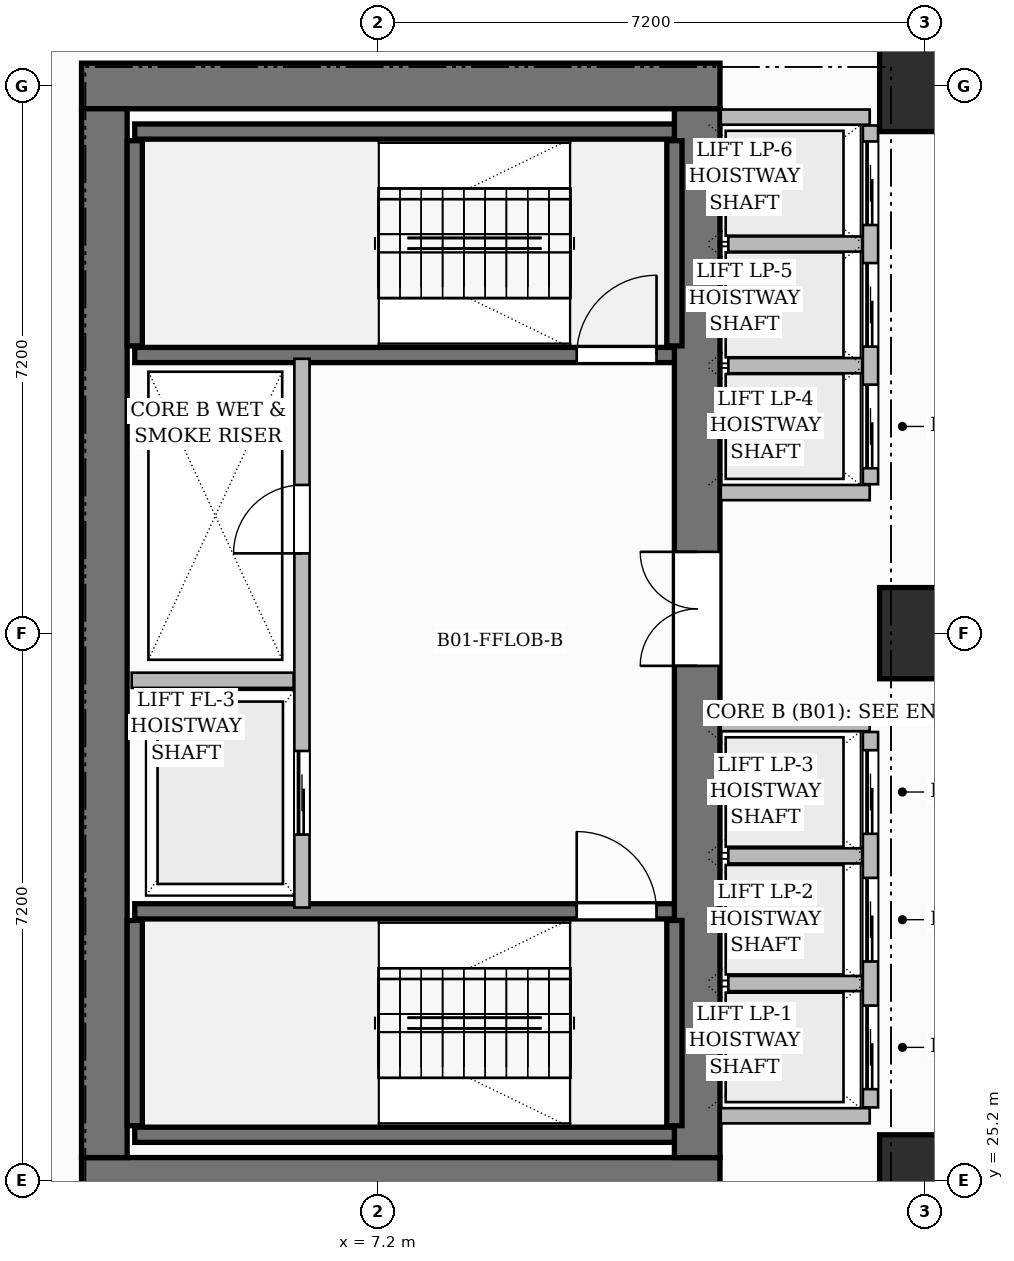
"""IFC4 building model, lengths in metres.
Left out: names, types, materials, properties, quantities, classifications, styles, units other than length and angle.
Written with IfcOpenShell. Run it as: python <this file> out.ifc"""

import sys

from ifc_helpers import new_model, si_unit, direction, frame, frame_2d, origin, origin_2d, place, context, subcontext, project, spatial, rectangle, extrude, source, transform, mapped, element, fill, save


model = new_model("IFC4")
c1 = context("Model", 3, precision=1e-05, world=origin(), true_north=direction((0.0, 1.0)))
c2 = subcontext(c1, "Body", "Model", "MODEL_VIEW")
j1 = project(units=[si_unit("LENGTHUNIT", "METRE"), si_unit("PLANEANGLEUNIT", "RADIAN")], contexts=[c1])
p1 = place(None, origin())
s1 = spatial("IfcSite", under=j1, at=p1, CompositionType="ELEMENT")
p2 = place(p1, origin())
s2 = spatial("IfcBuilding", under=s1, at=p2, CompositionType="ELEMENT")
p3 = place(p2, frame((0.0, 0.0, -6.5)))
s3 = spatial("IfcBuildingStorey", under=s2, at=p3, CompositionType="ELEMENT", Elevation=-6.5)
for number, where, z_axis, x_axis in (
    (1, (3.3, 25.2, 0.0), (0.0, 0.0, 1.0), (1.0, 0.0, 0.0)),
    (2, (3.3, 39.6, 0.0), (0.0, 0.0, 1.0), (1.0, 0.0, 0.0)),
):
    element("IfcWall", number, at=place(p3, frame(where, z_axis=z_axis, x_axis=x_axis)), inside=s3, PredefinedType="SHEAR", context=c2, shape_type="SweptSolid", body=[
        extrude(rectangle(XDim=8.4, YDim=0.6, at=frame_2d((4.2, 0.0))), origin(), (0.0, 0.0, 1.0), 6.5),
    ])
p4 = place(p3, frame((3.6, 25.5, 0.0), z_axis=(0.0, 0.0, 1.0), x_axis=(0.0, 1.0, 0.0)))
e3 = element("IfcWall", 3, at=p4, inside=s3, PredefinedType="SHEAR", context=c2, shape_type="SweptSolid", body=[
    extrude(rectangle(XDim=13.8, YDim=0.6, at=frame_2d((6.9, 0.0))), origin(), (0.0, 0.0, 1.0), 6.5),
])
p5 = place(p3, frame((11.4, 25.5, 0.0), z_axis=(0.0, 0.0, 1.0), x_axis=(0.0, 1.0, 0.0)))
e4 = element("IfcWall", 4, at=p5, inside=s3, PredefinedType="SHEAR", context=c2, shape_type="SweptSolid", body=[
    extrude(rectangle(XDim=13.8, YDim=0.6, at=frame_2d((6.9, 0.0))), origin(), (0.0, 0.0, 1.0), 6.5),
])
p6 = place(p5, frame((6.47, 0.0, 0.0)))
e5 = element("IfcOpeningElement", 5, at=p6, cuts=e4, PredefinedType="OPENING", context=c2, shape_type="SweptSolid", body=[
    extrude(rectangle(XDim=1.5, YDim=2.2, at=frame_2d((0.75, 1.1))), frame((0.0, 0.31, 0.0), z_axis=(0.0, -1.0, 0.0), x_axis=(1.0, 0.0, 0.0)), (0.0, 0.0, 1.0), 0.62),
])
m1 = source(origin(), c2, "Body", "SweptSolid", [
    extrude(rectangle(XDim=1.2, YDim=1.2, at=origin_2d()), origin(), (0.0, 0.0, 1.0), 6.5),
])
for number, where, z_axis, x_axis in (
    (6, (14.4, 25.2, 0.0), (0.0, 0.0, 1.0), (1.0, 0.0, 0.0)),
    (7, (14.4, 32.4, 0.0), (0.0, 0.0, 1.0), (1.0, 0.0, 0.0)),
    (8, (14.4, 39.6, 0.0), (0.0, 0.0, 1.0), (1.0, 0.0, 0.0)),
):
    element("IfcColumn", number, at=place(p3, frame(where, z_axis=z_axis, x_axis=x_axis)), inside=s3, PredefinedType="COLUMN", context=c2, shape_type="MappedRepresentation", body=[
        mapped(m1, transform((0.0, 0.0, 0.0), scale=1.0)),
    ])
p7 = place(p3, frame((4.0, 25.8, 0.0), z_axis=(0.0, 0.0, 1.0), x_axis=(1.0, 0.0, 0.0)))
e9 = element("IfcWall", 9, at=p7, inside=s3, PredefinedType="SHEAR", context=c2, shape_type="SweptSolid", body=[
    extrude(rectangle(XDim=7.1, YDim=0.2, at=frame_2d((3.55, 0.0))), origin(), (0.0, 0.0, 1.0), 6.5),
])
for number, where, z_axis, x_axis in (
    (10, (4.0, 25.92, 0.0), (0.0, 0.0, 1.0), (0.0, 1.0, 0.0)),
    (11, (11.1, 25.92, 0.0), (0.0, 0.0, 1.0), (0.0, 1.0, 0.0)),
):
    element("IfcWall", number, at=place(p3, frame(where, z_axis=z_axis, x_axis=x_axis)), inside=s3, PredefinedType="SHEAR", context=c2, shape_type="SweptSolid", body=[
        extrude(rectangle(XDim=2.7, YDim=0.2, at=frame_2d((1.35, 0.0))), origin(), (0.0, 0.0, 1.0), 6.5),
    ])
p8 = place(p3, frame((4.0, 28.74, 0.0), z_axis=(0.0, 0.0, 1.0), x_axis=(1.0, 0.0, 0.0)))
e12 = element("IfcWall", 12, at=p8, inside=s3, PredefinedType="SHEAR", context=c2, shape_type="SweptSolid", body=[
    extrude(rectangle(XDim=7.1, YDim=0.2, at=frame_2d((3.55, 0.0))), origin(), (0.0, 0.0, 1.0), 6.5),
])
p9 = place(p8, frame((5.815, 0.0, 0.0)))
e13 = element("IfcOpeningElement", 13, at=p9, cuts=e12, PredefinedType="OPENING", context=c2, shape_type="SweptSolid", body=[
    extrude(rectangle(XDim=1.05, YDim=2.2, at=frame_2d((0.525, 1.1))), frame((0.0, 0.11, 0.0), z_axis=(0.0, -1.0, 0.0), x_axis=(1.0, 0.0, 0.0)), (0.0, 0.0, 1.0), 0.22),
])
p10 = place(p3, frame((4.0, 39.0, 0.0), z_axis=(0.0, 0.0, 1.0), x_axis=(1.0, 0.0, 0.0)))
e14 = element("IfcWall", 14, at=p10, inside=s3, PredefinedType="SHEAR", context=c2, shape_type="SweptSolid", body=[
    extrude(rectangle(XDim=7.1, YDim=0.2, at=frame_2d((3.55, 0.0))), origin(), (0.0, 0.0, 1.0), 6.5),
])
for number, where, z_axis, x_axis in (
    (15, (4.0, 36.18, 0.0), (0.0, 0.0, 1.0), (0.0, 1.0, 0.0)),
    (16, (11.1, 36.18, 0.0), (0.0, 0.0, 1.0), (0.0, 1.0, 0.0)),
):
    element("IfcWall", number, at=place(p3, frame(where, z_axis=z_axis, x_axis=x_axis)), inside=s3, PredefinedType="SHEAR", context=c2, shape_type="SweptSolid", body=[
        extrude(rectangle(XDim=2.7, YDim=0.2, at=frame_2d((1.35, 0.0))), origin(), (0.0, 0.0, 1.0), 6.5),
    ])
p11 = place(p3, frame((4.0, 36.06, 0.0), z_axis=(0.0, 0.0, 1.0), x_axis=(1.0, 0.0, 0.0)))
e17 = element("IfcWall", 17, at=p11, inside=s3, PredefinedType="SHEAR", context=c2, shape_type="SweptSolid", body=[
    extrude(rectangle(XDim=7.1, YDim=0.2, at=frame_2d((3.55, 0.0))), origin(), (0.0, 0.0, 1.0), 6.5),
])
p12 = place(p11, frame((5.815, 0.0, 0.0)))
e18 = element("IfcOpeningElement", 18, at=p12, cuts=e17, PredefinedType="OPENING", context=c2, shape_type="SweptSolid", body=[
    extrude(rectangle(XDim=1.05, YDim=2.2, at=frame_2d((0.525, 1.1))), frame((0.0, 0.11, 0.0), z_axis=(0.0, -1.0, 0.0), x_axis=(1.0, 0.0, 0.0)), (0.0, 0.0, 1.0), 0.22),
])
p13 = place(p3, frame((6.2, 28.79, 0.0), z_axis=(0.0, 0.0, 1.0), x_axis=(0.0, 1.0, 0.0)))
e19 = element("IfcWall", 19, at=p13, inside=s3, PredefinedType="PARTITIONING", context=c2, shape_type="SweptSolid", body=[
    extrude(rectangle(XDim=7.22, YDim=0.2, at=frame_2d((3.61, 0.0))), origin(), (0.0, 0.0, 1.0), 6.1),
])
p14 = place(p13, frame((4.66, 0.0, 0.0)))
e20 = element("IfcOpeningElement", 20, at=p14, cuts=e19, PredefinedType="OPENING", context=c2, shape_type="SweptSolid", body=[
    extrude(rectangle(XDim=0.9, YDim=2.1, at=frame_2d((0.45, 1.05))), frame((0.0, 0.11, 0.0), z_axis=(0.0, -1.0, 0.0), x_axis=(1.0, 0.0, 0.0)), (0.0, 0.0, 1.0), 0.22),
])
p15 = place(p13, frame((0.96, 0.0, 0.0)))
e21 = element("IfcOpeningElement", 21, at=p15, cuts=e19, PredefinedType="OPENING", context=c2, shape_type="SweptSolid", body=[
    extrude(rectangle(XDim=1.1, YDim=2.2, at=frame_2d((0.55, 1.1))), frame((0.0, 0.11, 0.0), z_axis=(0.0, -1.0, 0.0), x_axis=(1.0, 0.0, 0.0)), (0.0, 0.0, 1.0), 0.22),
])
p16 = place(p3, frame((3.96, 31.78, 0.0), z_axis=(0.0, 0.0, 1.0), x_axis=(1.0, 0.0, 0.0)))
e22 = element("IfcWall", 22, at=p16, inside=s3, PredefinedType="PARTITIONING", context=c2, shape_type="SweptSolid", body=[
    extrude(rectangle(XDim=2.13, YDim=0.2, at=frame_2d((1.065, 0.0))), origin(), (0.0, 0.0, 1.0), 6.1),
])
for number, where, z_axis, x_axis in (
    (23, (11.71, 26.05, 0.0), (0.0, 0.0, 1.0), (1.0, 0.0, 0.0)),
    (24, (11.71, 31.21, 0.0), (0.0, 0.0, 1.0), (1.0, 0.0, 0.0)),
):
    element("IfcWall", number, at=place(p3, frame(where, z_axis=z_axis, x_axis=x_axis)), inside=s3, PredefinedType="PARTITIONING", context=c2, shape_type="SweptSolid", body=[
        extrude(rectangle(XDim=1.96, YDim=0.2, at=frame_2d((0.98, 0.0))), origin(), (0.0, 0.0, 1.0), 6.1),
    ])
p17 = place(p3, frame((13.68, 26.16, 0.0), z_axis=(0.0, 0.0, 1.0), x_axis=(0.0, 1.0, 0.0)))
e25 = element("IfcWall", 25, at=p17, inside=s3, PredefinedType="PARTITIONING", context=c2, shape_type="SweptSolid", body=[
    extrude(rectangle(XDim=4.94, YDim=0.2, at=frame_2d((2.47, 0.0))), origin(), (0.0, 0.0, 1.0), 6.1),
])
p18 = place(p17, frame((0.24, 0.0, 0.0)))
e26 = element("IfcOpeningElement", 26, at=p18, cuts=e25, PredefinedType="OPENING", context=c2, shape_type="SweptSolid", body=[
    extrude(rectangle(XDim=1.1, YDim=2.2, at=frame_2d((0.55, 1.1))), frame((0.0, 0.11, 0.0), z_axis=(0.0, -1.0, 0.0), x_axis=(1.0, 0.0, 0.0)), (0.0, 0.0, 1.0), 0.22),
])
p19 = place(p17, frame((1.92, 0.0, 0.0)))
e27 = element("IfcOpeningElement", 27, at=p19, cuts=e25, PredefinedType="OPENING", context=c2, shape_type="SweptSolid", body=[
    extrude(rectangle(XDim=1.1, YDim=2.2, at=frame_2d((0.55, 1.1))), frame((0.0, 0.11, 0.0), z_axis=(0.0, -1.0, 0.0), x_axis=(1.0, 0.0, 0.0)), (0.0, 0.0, 1.0), 0.22),
])
p20 = place(p17, frame((3.6, 0.0, 0.0)))
e28 = element("IfcOpeningElement", 28, at=p20, cuts=e25, PredefinedType="OPENING", context=c2, shape_type="SweptSolid", body=[
    extrude(rectangle(XDim=1.1, YDim=2.2, at=frame_2d((0.55, 1.1))), frame((0.0, 0.11, 0.0), z_axis=(0.0, -1.0, 0.0), x_axis=(1.0, 0.0, 0.0)), (0.0, 0.0, 1.0), 0.22),
])
for number, where, z_axis, x_axis in (
    (29, (11.81, 27.79, 0.0), (0.0, 0.0, 1.0), (1.0, 0.0, 0.0)),
    (30, (11.81, 29.47, 0.0), (0.0, 0.0, 1.0), (1.0, 0.0, 0.0)),
):
    element("IfcWall", number, at=place(p3, frame(where, z_axis=z_axis, x_axis=x_axis)), inside=s3, PredefinedType="PARTITIONING", context=c2, shape_type="SweptSolid", body=[
        extrude(rectangle(XDim=1.76, YDim=0.2, at=frame_2d((0.88, 0.0))), origin(), (0.0, 0.0, 1.0), 6.1),
    ])
p21 = place(p3, frame((11.71, 34.25, 0.0), z_axis=(0.0, 0.0, 1.0), x_axis=(1.0, 0.0, 0.0)))
e31 = element("IfcWall", 31, at=p21, inside=s3, PredefinedType="PARTITIONING", context=c2, shape_type="SweptSolid", body=[
    extrude(rectangle(XDim=1.96, YDim=0.2, at=frame_2d((0.98, 0.0))), origin(), (0.0, 0.0, 1.0), 6.1),
])
p22 = place(p3, frame((11.71, 39.19, 0.0), z_axis=(0.0, 0.0, 1.0), x_axis=(1.0, 0.0, 0.0)))
e32 = element("IfcWall", 32, at=p22, inside=s3, PredefinedType="PARTITIONING", context=c2, shape_type="SweptSolid", body=[
    extrude(rectangle(XDim=1.96, YDim=0.2, at=frame_2d((0.98, 0.0))), origin(), (0.0, 0.0, 1.0), 5.185),
])
p23 = place(p3, frame((13.68, 34.36, 0.0), z_axis=(0.0, 0.0, 1.0), x_axis=(0.0, 1.0, 0.0)))
e33 = element("IfcWall", 33, at=p23, inside=s3, PredefinedType="PARTITIONING", context=c2, shape_type="SweptSolid", body=[
    extrude(rectangle(XDim=4.72, YDim=0.2, at=frame_2d((2.36, 0.0))), origin(), (0.0, 0.0, 1.0), 6.1),
])
p24 = place(p23, frame((0.21, 0.0, 0.0)))
e34 = element("IfcOpeningElement", 34, at=p24, cuts=e33, PredefinedType="OPENING", context=c2, shape_type="SweptSolid", body=[
    extrude(rectangle(XDim=1.1, YDim=2.2, at=frame_2d((0.55, 1.1))), frame((0.0, 0.11, 0.0), z_axis=(0.0, -1.0, 0.0), x_axis=(1.0, 0.0, 0.0)), (0.0, 0.0, 1.0), 0.22),
])
p25 = place(p23, frame((1.81, 0.0, 0.0)))
e35 = element("IfcOpeningElement", 35, at=p25, cuts=e33, PredefinedType="OPENING", context=c2, shape_type="SweptSolid", body=[
    extrude(rectangle(XDim=1.1, YDim=2.2, at=frame_2d((0.55, 1.1))), frame((0.0, 0.11, 0.0), z_axis=(0.0, -1.0, 0.0), x_axis=(1.0, 0.0, 0.0)), (0.0, 0.0, 1.0), 0.22),
])
p26 = place(p23, frame((3.41, 0.0, 0.0)))
e36 = element("IfcOpeningElement", 36, at=p26, cuts=e33, PredefinedType="OPENING", context=c2, shape_type="SweptSolid", body=[
    extrude(rectangle(XDim=1.1, YDim=2.2, at=frame_2d((0.55, 1.1))), frame((0.0, 0.11, 0.0), z_axis=(0.0, -1.0, 0.0), x_axis=(1.0, 0.0, 0.0)), (0.0, 0.0, 1.0), 0.22),
])
for number, where, z_axis, x_axis in (
    (37, (11.81, 35.92, 0.0), (0.0, 0.0, 1.0), (1.0, 0.0, 0.0)),
    (38, (11.81, 37.52, 0.0), (0.0, 0.0, 1.0), (1.0, 0.0, 0.0)),
):
    element("IfcWall", number, at=place(p3, frame(where, z_axis=z_axis, x_axis=x_axis)), inside=s3, PredefinedType="PARTITIONING", context=c2, shape_type="SweptSolid", body=[
        extrude(rectangle(XDim=1.76, YDim=0.2, at=frame_2d((0.88, 0.0))), origin(), (0.0, 0.0, 1.0), 6.1),
    ])
p27 = place(p3, frame((13.84, 25.2, 0.0), z_axis=(0.0, 0.0, 1.0), x_axis=(1.0, 0.0, 0.0)))
e39 = element("IfcWall", 39, at=p27, inside=s3, PredefinedType="PARTITIONING", context=c2, shape_type="SweptSolid", body=[
    extrude(rectangle(XDim=66.277, YDim=0.22, at=frame_2d((33.138, 0.0))), origin(), (0.0, 0.0, 1.0), 5.185),
])
p28 = place(p27, frame((11.91, 0.0, 0.0)))
e40 = element("IfcOpeningElement", 40, at=p28, cuts=e39, PredefinedType="OPENING", context=c2, shape_type="SweptSolid", body=[
    extrude(rectangle(XDim=1.5, YDim=2.2, at=frame_2d((0.75, 1.1))), frame((0.0, 0.12, 0.0), z_axis=(0.0, -1.0, 0.0), x_axis=(1.0, 0.0, 0.0)), (0.0, 0.0, 1.0), 0.24),
])
p29 = place(p27, frame((33.41, 0.0, 0.0)))
e41 = element("IfcOpeningElement", 41, at=p29, cuts=e39, PredefinedType="OPENING", context=c2, shape_type="SweptSolid", body=[
    extrude(rectangle(XDim=1.5, YDim=2.2, at=frame_2d((0.75, 1.1))), frame((0.0, 0.12, 0.0), z_axis=(0.0, -1.0, 0.0), x_axis=(1.0, 0.0, 0.0)), (0.0, 0.0, 1.0), 0.24),
])
m2 = source(origin(), c2, "Body", "SweptSolid", [
    extrude(rectangle(XDim=1.05, YDim=2.2, at=frame_2d((0.525, 1.1))), frame((0.0, 0.025, 0.0), z_axis=(0.0, -1.0, 0.0), x_axis=(1.0, 0.0, 0.0)), (0.0, 0.0, 1.0), 0.05),
])
p30 = place(p9, origin())
e42 = element("IfcDoor", 42, at=p30, inside=s3, OperationType="SINGLE_SWING_LEFT", PredefinedType="DOOR", context=c2, shape_type="MappedRepresentation", body=[
    mapped(m2, transform((0.0, 0.0, 0.0), scale=1.0)),
])
fill(e13, e42)
p31 = place(p12, origin())
e43 = element("IfcDoor", 43, at=p31, inside=s3, OperationType="SINGLE_SWING_RIGHT", PredefinedType="DOOR", context=c2, shape_type="MappedRepresentation", body=[
    mapped(m2, transform((0.0, 0.0, 0.0), scale=1.0)),
])
fill(e18, e43)
m3 = source(origin(), c2, "Body", "SweptSolid", [
    extrude(rectangle(XDim=0.9, YDim=2.1, at=frame_2d((0.45, 1.05))), frame((0.0, 0.025, 0.0), z_axis=(0.0, -1.0, 0.0), x_axis=(1.0, 0.0, 0.0)), (0.0, 0.0, 1.0), 0.05),
])
p32 = place(p14, origin())
e44 = element("IfcDoor", 44, at=p32, inside=s3, OperationType="SINGLE_SWING_LEFT", PredefinedType="DOOR", context=c2, shape_type="MappedRepresentation", body=[
    mapped(m3, transform((0.0, 0.0, 0.0), scale=1.0)),
])
fill(e20, e44)
m4 = source(origin(), c2, "Body", "SweptSolid", [
    extrude(rectangle(XDim=1.5, YDim=2.2, at=frame_2d((0.75, 1.1))), frame((0.0, 0.025, 0.0), z_axis=(0.0, -1.0, 0.0), x_axis=(1.0, 0.0, 0.0)), (0.0, 0.0, 1.0), 0.05),
])
p33 = place(p6, origin())
e45 = element("IfcDoor", 45, at=p33, inside=s3, OperationType="DOUBLE_DOOR_SINGLE_SWING", PredefinedType="DOOR", context=c2, shape_type="MappedRepresentation", body=[
    mapped(m4, transform((0.0, 0.0, 0.0), scale=1.0)),
])
fill(e5, e45)
m5 = source(origin(), c2, "Body", "SweptSolid", [
    extrude(rectangle(XDim=1.1, YDim=2.2, at=frame_2d((0.55, 1.1))), frame((0.0, 0.025, 0.0), z_axis=(0.0, -1.0, 0.0), x_axis=(1.0, 0.0, 0.0)), (0.0, 0.0, 1.0), 0.05),
])
p34 = place(p15, origin())
e46 = element("IfcDoor", 46, at=p34, inside=s3, OperationType="SLIDING_TO_LEFT", PredefinedType="DOOR", context=c2, shape_type="MappedRepresentation", body=[
    mapped(m5, transform((0.0, 0.0, 0.0), scale=1.0)),
])
fill(e21, e46)
p35 = place(p18, origin())
e47 = element("IfcDoor", 47, at=p35, inside=s3, OperationType="SLIDING_TO_LEFT", PredefinedType="DOOR", context=c2, shape_type="MappedRepresentation", body=[
    mapped(m5, transform((0.0, 0.0, 0.0), scale=1.0)),
])
fill(e26, e47)
p36 = place(p19, origin())
e48 = element("IfcDoor", 48, at=p36, inside=s3, OperationType="SLIDING_TO_LEFT", PredefinedType="DOOR", context=c2, shape_type="MappedRepresentation", body=[
    mapped(m5, transform((0.0, 0.0, 0.0), scale=1.0)),
])
fill(e27, e48)
p37 = place(p20, origin())
e49 = element("IfcDoor", 49, at=p37, inside=s3, OperationType="SLIDING_TO_LEFT", PredefinedType="DOOR", context=c2, shape_type="MappedRepresentation", body=[
    mapped(m5, transform((0.0, 0.0, 0.0), scale=1.0)),
])
fill(e28, e49)
p38 = place(p24, origin())
e50 = element("IfcDoor", 50, at=p38, inside=s3, OperationType="SLIDING_TO_LEFT", PredefinedType="DOOR", context=c2, shape_type="MappedRepresentation", body=[
    mapped(m5, transform((0.0, 0.0, 0.0), scale=1.0)),
])
fill(e34, e50)
p39 = place(p25, origin())
e51 = element("IfcDoor", 51, at=p39, inside=s3, OperationType="SLIDING_TO_LEFT", PredefinedType="DOOR", context=c2, shape_type="MappedRepresentation", body=[
    mapped(m5, transform((0.0, 0.0, 0.0), scale=1.0)),
])
fill(e35, e51)
p40 = place(p26, origin())
e52 = element("IfcDoor", 52, at=p40, inside=s3, OperationType="SLIDING_TO_LEFT", PredefinedType="DOOR", context=c2, shape_type="MappedRepresentation", body=[
    mapped(m5, transform((0.0, 0.0, 0.0), scale=1.0)),
])
fill(e36, e52)
save(model, sys.argv[1])
